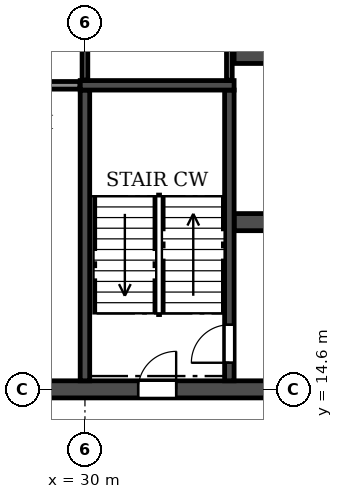
"""IFC4 building model, lengths in metres.
Left out: names, types, materials, properties, quantities, classifications, styles, units other than length and angle.
Written with IfcOpenShell. Run it as: python <this file> out.ifc"""

import sys

from ifc_helpers import new_model, si_unit, direction, frame, frame_2d, origin, place, context, subcontext, project, spatial, rectangle, extrude, element, fill, save


model = new_model("IFC4")
c1 = context("Model", 3, precision=1e-05, world=origin(), true_north=direction((0.0, 1.0)))
c2 = subcontext(c1, "Body", "Model", "MODEL_VIEW")
j1 = project(units=[si_unit("LENGTHUNIT", "METRE"), si_unit("PLANEANGLEUNIT", "RADIAN")], contexts=[c1])
p1 = place(None, origin())
s1 = spatial("IfcSite", under=j1, at=p1, CompositionType="ELEMENT")
p2 = place(p1, origin())
s2 = spatial("IfcBuilding", under=s1, at=p2, CompositionType="ELEMENT")
p3 = place(p2, frame((0.0, 0.0, 19.2)))
s3 = spatial("IfcBuildingStorey", under=s2, at=p3, CompositionType="ELEMENT", Elevation=19.2)
p4 = place(p3, frame((18.0, 14.6, 0.0), z_axis=(0.0, 0.0, 1.0), x_axis=(1.0, 0.0, 0.0)))
e1 = element("IfcWall", 1, at=p4, inside=s3, PredefinedType="SOLIDWALL", context=c2, shape_type="SweptSolid", body=[
    extrude(rectangle(XDim=66.0, YDim=0.45, at=frame_2d((33.0, 0.0))), origin(), (0.0, 0.0, 1.0), 3.95),
])
p5 = place(p4, frame((0.9, 0.0, 0.0)))
e2 = element("IfcOpeningElement", 2, at=p5, cuts=e1, PredefinedType="OPENING", context=c2, shape_type="SweptSolid", body=[
    extrude(rectangle(XDim=1.0, YDim=2.1, at=frame_2d((0.5, 1.05))), frame((0.0, 0.235, 0.0), z_axis=(0.0, -1.0, 0.0), x_axis=(1.0, 0.0, 0.0)), (0.0, 0.0, 1.0), 0.47),
])
p6 = place(p4, frame((8.8, 0.0, 0.0)))
e3 = element("IfcOpeningElement", 3, at=p6, cuts=e1, PredefinedType="OPENING", context=c2, shape_type="SweptSolid", body=[
    extrude(rectangle(XDim=1.0, YDim=2.1, at=frame_2d((0.5, 1.05))), frame((0.0, 0.235, 0.0), z_axis=(0.0, -1.0, 0.0), x_axis=(1.0, 0.0, 0.0)), (0.0, 0.0, 1.0), 0.47),
])
p7 = place(p4, frame((13.4, 0.0, 0.0)))
e4 = element("IfcOpeningElement", 4, at=p7, cuts=e1, PredefinedType="OPENING", context=c2, shape_type="SweptSolid", body=[
    extrude(rectangle(XDim=1.0, YDim=2.1, at=frame_2d((0.5, 1.05))), frame((0.0, 0.235, 0.0), z_axis=(0.0, -1.0, 0.0), x_axis=(1.0, 0.0, 0.0)), (0.0, 0.0, 1.0), 0.47),
])
p8 = place(p4, frame((27.3, 0.0, 0.0)))
e5 = element("IfcOpeningElement", 5, at=p8, cuts=e1, PredefinedType="OPENING", context=c2, shape_type="SweptSolid", body=[
    extrude(rectangle(XDim=1.0, YDim=2.1, at=frame_2d((0.5, 1.05))), frame((0.0, 0.235, 0.0), z_axis=(0.0, -1.0, 0.0), x_axis=(1.0, 0.0, 0.0)), (0.0, 0.0, 1.0), 0.47),
])
p9 = place(p4, frame((32.5, 0.0, 0.0)))
e6 = element("IfcOpeningElement", 6, at=p9, cuts=e1, PredefinedType="OPENING", context=c2, shape_type="SweptSolid", body=[
    extrude(rectangle(XDim=1.0, YDim=2.1, at=frame_2d((0.5, 1.05))), frame((0.0, 0.235, 0.0), z_axis=(0.0, -1.0, 0.0), x_axis=(1.0, 0.0, 0.0)), (0.0, 0.0, 1.0), 0.47),
])
p10 = place(p4, frame((35.1, 0.0, 0.0)))
e7 = element("IfcOpeningElement", 7, at=p10, cuts=e1, PredefinedType="OPENING", context=c2, shape_type="SweptSolid", body=[
    extrude(rectangle(XDim=1.0, YDim=2.1, at=frame_2d((0.5, 1.05))), frame((0.0, 0.235, 0.0), z_axis=(0.0, -1.0, 0.0), x_axis=(1.0, 0.0, 0.0)), (0.0, 0.0, 1.0), 0.47),
])
p11 = place(p4, frame((39.0, 0.0, 0.0)))
e8 = element("IfcOpeningElement", 8, at=p11, cuts=e1, PredefinedType="OPENING", context=c2, shape_type="SweptSolid", body=[
    extrude(rectangle(XDim=1.0, YDim=2.1, at=frame_2d((0.5, 1.05))), frame((0.0, 0.235, 0.0), z_axis=(0.0, -1.0, 0.0), x_axis=(1.0, 0.0, 0.0)), (0.0, 0.0, 1.0), 0.47),
])
p12 = place(p4, frame((51.6, 0.0, 0.0)))
e9 = element("IfcOpeningElement", 9, at=p12, cuts=e1, PredefinedType="OPENING", context=c2, shape_type="SweptSolid", body=[
    extrude(rectangle(XDim=1.0, YDim=2.1, at=frame_2d((0.5, 1.05))), frame((0.0, 0.235, 0.0), z_axis=(0.0, -1.0, 0.0), x_axis=(1.0, 0.0, 0.0)), (0.0, 0.0, 1.0), 0.47),
])
p13 = place(p4, frame((56.25, 0.0, 0.0)))
e10 = element("IfcOpeningElement", 10, at=p13, cuts=e1, PredefinedType="OPENING", context=c2, shape_type="SweptSolid", body=[
    extrude(rectangle(XDim=0.9, YDim=2.1, at=frame_2d((0.45, 1.05))), frame((0.0, 0.235, 0.0), z_axis=(0.0, -1.0, 0.0), x_axis=(1.0, 0.0, 0.0)), (0.0, 0.0, 1.0), 0.47),
])
p14 = place(p4, frame((64.1, 0.0, 0.0)))
e11 = element("IfcOpeningElement", 11, at=p14, cuts=e1, PredefinedType="OPENING", context=c2, shape_type="SweptSolid", body=[
    extrude(rectangle(XDim=1.0, YDim=2.1, at=frame_2d((0.5, 1.05))), frame((0.0, 0.235, 0.0), z_axis=(0.0, -1.0, 0.0), x_axis=(1.0, 0.0, 0.0)), (0.0, 0.0, 1.0), 0.47),
])
p15 = place(p3, frame((33.925, 19.0, 0.0), z_axis=(0.0, 0.0, 1.0), x_axis=(1.0, 0.0, 0.0)))
e12 = element("IfcWall", 12, at=p15, inside=s3, PredefinedType="SOLIDWALL", context=c2, shape_type="SweptSolid", body=[
    extrude(rectangle(XDim=34.15, YDim=0.45, at=frame_2d((17.075, 0.0))), origin(), (0.0, 0.0, 1.0), 3.95),
])
p16 = place(p15, frame((16.175, 0.0, 0.0)))
e13 = element("IfcOpeningElement", 13, at=p16, cuts=e12, PredefinedType="OPENING", context=c2, shape_type="SweptSolid", body=[
    extrude(rectangle(XDim=1.8, YDim=2.1, at=frame_2d((0.9, 1.05))), frame((0.0, 0.235, 0.0), z_axis=(0.0, -1.0, 0.0), x_axis=(1.0, 0.0, 0.0)), (0.0, 0.0, 1.0), 0.47),
])
p17 = place(p15, frame((1.525, 0.0, 0.0)))
e14 = element("IfcOpeningElement", 14, at=p17, cuts=e12, PredefinedType="OPENING", context=c2, shape_type="SweptSolid", body=[
    extrude(rectangle(XDim=1.8, YDim=2.1, at=frame_2d((0.9, 1.05))), frame((0.0, 0.235, 0.0), z_axis=(0.0, -1.0, 0.0), x_axis=(1.0, 0.0, 0.0)), (0.0, 0.0, 1.0), 0.47),
])
p18 = place(p15, frame((8.725, 0.0, 0.0)))
e15 = element("IfcOpeningElement", 15, at=p18, cuts=e12, PredefinedType="OPENING", context=c2, shape_type="SweptSolid", body=[
    extrude(rectangle(XDim=1.1, YDim=2.1, at=frame_2d((0.55, 1.05))), frame((0.0, 0.235, 0.0), z_axis=(0.0, -1.0, 0.0), x_axis=(1.0, 0.0, 0.0)), (0.0, 0.0, 1.0), 0.47),
])
p19 = place(p15, frame((11.325, 0.0, 0.0)))
e16 = element("IfcOpeningElement", 16, at=p19, cuts=e12, PredefinedType="OPENING", context=c2, shape_type="SweptSolid", body=[
    extrude(rectangle(XDim=1.1, YDim=2.1, at=frame_2d((0.55, 1.05))), frame((0.0, 0.235, 0.0), z_axis=(0.0, -1.0, 0.0), x_axis=(1.0, 0.0, 0.0)), (0.0, 0.0, 1.0), 0.47),
])
p20 = place(p15, frame((13.925, 0.0, 0.0)))
e17 = element("IfcOpeningElement", 17, at=p20, cuts=e12, PredefinedType="OPENING", context=c2, shape_type="SweptSolid", body=[
    extrude(rectangle(XDim=1.1, YDim=2.1, at=frame_2d((0.55, 1.05))), frame((0.0, 0.235, 0.0), z_axis=(0.0, -1.0, 0.0), x_axis=(1.0, 0.0, 0.0)), (0.0, 0.0, 1.0), 0.47),
])
p21 = place(p15, frame((19.125, 0.0, 0.0)))
e18 = element("IfcOpeningElement", 18, at=p21, cuts=e12, PredefinedType="OPENING", context=c2, shape_type="SweptSolid", body=[
    extrude(rectangle(XDim=1.1, YDim=2.1, at=frame_2d((0.55, 1.05))), frame((0.0, 0.235, 0.0), z_axis=(0.0, -1.0, 0.0), x_axis=(1.0, 0.0, 0.0)), (0.0, 0.0, 1.0), 0.47),
])
p22 = place(p15, frame((21.725, 0.0, 0.0)))
e19 = element("IfcOpeningElement", 19, at=p22, cuts=e12, PredefinedType="OPENING", context=c2, shape_type="SweptSolid", body=[
    extrude(rectangle(XDim=1.1, YDim=2.1, at=frame_2d((0.55, 1.05))), frame((0.0, 0.235, 0.0), z_axis=(0.0, -1.0, 0.0), x_axis=(1.0, 0.0, 0.0)), (0.0, 0.0, 1.0), 0.47),
])
p23 = place(p15, frame((24.325, 0.0, 0.0)))
e20 = element("IfcOpeningElement", 20, at=p23, cuts=e12, PredefinedType="OPENING", context=c2, shape_type="SweptSolid", body=[
    extrude(rectangle(XDim=1.1, YDim=2.1, at=frame_2d((0.55, 1.05))), frame((0.0, 0.235, 0.0), z_axis=(0.0, -1.0, 0.0), x_axis=(1.0, 0.0, 0.0)), (0.0, 0.0, 1.0), 0.47),
])
p24 = place(p15, frame((30.825, 0.0, 0.0)))
e21 = element("IfcOpeningElement", 21, at=p24, cuts=e12, PredefinedType="OPENING", context=c2, shape_type="SweptSolid", body=[
    extrude(rectangle(XDim=1.8, YDim=2.1, at=frame_2d((0.9, 1.05))), frame((0.0, 0.235, 0.0), z_axis=(0.0, -1.0, 0.0), x_axis=(1.0, 0.0, 0.0)), (0.0, 0.0, 1.0), 0.47),
])
p25 = place(p3, frame((33.925, 23.4, 0.0), z_axis=(0.0, 0.0, 1.0), x_axis=(1.0, 0.0, 0.0)))
e22 = element("IfcWall", 22, at=p25, inside=s3, PredefinedType="SOLIDWALL", context=c2, shape_type="SweptSolid", body=[
    extrude(rectangle(XDim=34.15, YDim=0.45, at=frame_2d((17.075, 0.0))), origin(), (0.0, 0.0, 1.0), 3.95),
])
p26 = place(p25, frame((16.175, 0.0, 0.0)))
e23 = element("IfcOpeningElement", 23, at=p26, cuts=e22, PredefinedType="OPENING", context=c2, shape_type="SweptSolid", body=[
    extrude(rectangle(XDim=1.8, YDim=2.1, at=frame_2d((0.9, 1.05))), frame((0.0, 0.235, 0.0), z_axis=(0.0, -1.0, 0.0), x_axis=(1.0, 0.0, 0.0)), (0.0, 0.0, 1.0), 0.47),
])
p27 = place(p25, frame((11.025, 0.0, 0.0)))
e24 = element("IfcOpeningElement", 24, at=p27, cuts=e22, PredefinedType="OPENING", context=c2, shape_type="SweptSolid", body=[
    extrude(rectangle(XDim=1.1, YDim=2.1, at=frame_2d((0.55, 1.05))), frame((0.0, 0.235, 0.0), z_axis=(0.0, -1.0, 0.0), x_axis=(1.0, 0.0, 0.0)), (0.0, 0.0, 1.0), 0.47),
])
p28 = place(p25, frame((29.825, 0.0, 0.0)))
e25 = element("IfcOpeningElement", 25, at=p28, cuts=e22, PredefinedType="OPENING", context=c2, shape_type="SweptSolid", body=[
    extrude(rectangle(XDim=1.1, YDim=2.1, at=frame_2d((0.55, 1.05))), frame((0.0, 0.235, 0.0), z_axis=(0.0, -1.0, 0.0), x_axis=(1.0, 0.0, 0.0)), (0.0, 0.0, 1.0), 0.47),
])
p29 = place(p25, frame((32.425, 0.0, 0.0)))
e26 = element("IfcOpeningElement", 26, at=p29, cuts=e22, PredefinedType="OPENING", context=c2, shape_type="SweptSolid", body=[
    extrude(rectangle(XDim=1.1, YDim=2.1, at=frame_2d((0.55, 1.05))), frame((0.0, 0.235, 0.0), z_axis=(0.0, -1.0, 0.0), x_axis=(1.0, 0.0, 0.0)), (0.0, 0.0, 1.0), 0.47),
])
p30 = place(p3, frame((30.0, 14.825, 0.0), z_axis=(0.0, 0.0, 1.0), x_axis=(0.0, 1.0, 0.0)))
e27 = element("IfcWall", 27, at=p30, inside=s3, PredefinedType="SOLIDWALL", context=c2, shape_type="SweptSolid", body=[
    extrude(rectangle(XDim=7.65, YDim=0.25, at=frame_2d((3.825, 0.0))), origin(), (0.0, 0.0, 1.0), 3.95),
])
p31 = place(p3, frame((33.8, 14.825, 0.0), z_axis=(0.0, 0.0, 1.0), x_axis=(0.0, 1.0, 0.0)))
e28 = element("IfcWall", 28, at=p31, inside=s3, PredefinedType="SOLIDWALL", context=c2, shape_type="SweptSolid", body=[
    extrude(rectangle(XDim=7.65, YDim=0.25, at=frame_2d((3.825, 0.0))), origin(), (0.0, 0.0, 1.0), 3.95),
])
p32 = place(p31, frame((0.475, 0.0, 0.0)))
e29 = element("IfcOpeningElement", 29, at=p32, cuts=e28, PredefinedType="OPENING", context=c2, shape_type="SweptSolid", body=[
    extrude(rectangle(XDim=1.0, YDim=2.1, at=frame_2d((0.5, 1.05))), frame((0.0, 0.135, 0.0), z_axis=(0.0, -1.0, 0.0), x_axis=(1.0, 0.0, 0.0)), (0.0, 0.0, 1.0), 0.27),
])
p33 = place(p3, frame((29.875, 22.6, 0.0), z_axis=(0.0, 0.0, 1.0), x_axis=(1.0, 0.0, 0.0)))
e30 = element("IfcWall", 30, at=p33, inside=s3, PredefinedType="SOLIDWALL", context=c2, shape_type="SweptSolid", body=[
    extrude(rectangle(XDim=4.05, YDim=0.25, at=frame_2d((2.025, 0.0))), origin(), (0.0, 0.0, 1.0), 3.95),
])
p34 = place(p3, frame((24.735, 22.6, 0.0), z_axis=(0.0, 0.0, 1.0), x_axis=(1.0, 0.0, 0.0)))
e31 = element("IfcWall", 31, at=p34, inside=s3, PredefinedType="PARTITIONING", context=c2, shape_type="SweptSolid", body=[
    extrude(rectangle(XDim=5.13, YDim=0.2, at=frame_2d((2.565, 0.0))), origin(), (0.0, 0.0, 1.0), 3.95),
])
for number, where, z_axis, x_axis in (
    (32, (30.0, 22.735, 0.0), (0.0, 0.0, 1.0), (0.0, 1.0, 0.0)),
    (33, (33.8, 22.735, 0.0), (0.0, 0.0, 1.0), (0.0, 1.0, 0.0)),
):
    element("IfcWall", number, at=place(p3, frame(where, z_axis=z_axis, x_axis=x_axis)), inside=s3, PredefinedType="PARTITIONING", context=c2, shape_type="SweptSolid", body=[
        extrude(rectangle(XDim=4.83, YDim=0.15, at=frame_2d((2.415, 0.0))), origin(), (0.0, 0.0, 1.0), 3.95),
    ])
p35 = place(p7, origin())
e34 = element("IfcDoor", 34, at=p35, inside=s3, OperationType="SINGLE_SWING_RIGHT", PredefinedType="DOOR", context=c2, shape_type="SweptSolid", body=[
    extrude(rectangle(XDim=1.0, YDim=2.1, at=frame_2d((0.5, 1.05))), frame((0.0, 0.025, 0.0), z_axis=(0.0, -1.0, 0.0), x_axis=(1.0, 0.0, 0.0)), (0.0, 0.0, 1.0), 0.05),
])
fill(e4, e34)
p36 = place(p32, origin())
e35 = element("IfcDoor", 35, at=p36, inside=s3, OperationType="SINGLE_SWING_LEFT", PredefinedType="DOOR", context=c2, shape_type="SweptSolid", body=[
    extrude(rectangle(XDim=1.0, YDim=2.1, at=frame_2d((0.5, 1.05))), frame((0.0, 0.025, 0.0), z_axis=(0.0, -1.0, 0.0), x_axis=(1.0, 0.0, 0.0)), (0.0, 0.0, 1.0), 0.05),
])
fill(e29, e35)
save(model, sys.argv[1])
